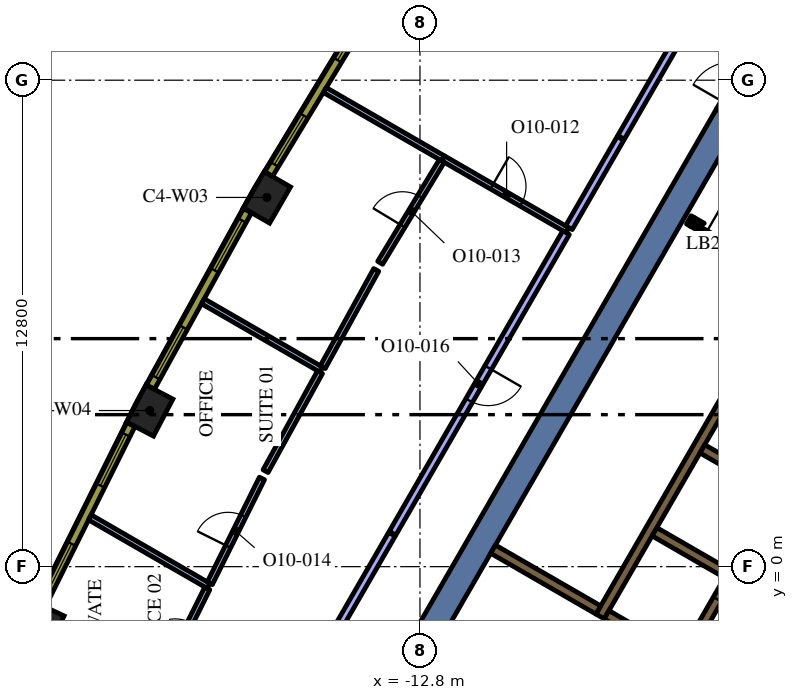
"""IFC4 building model, lengths in metres.
Left out: names, types, materials, properties, quantities, classifications, styles, units other than length and angle.
Written with IfcOpenShell. Run it as: python <this file> out.ifc"""

import sys

from ifc_helpers import new_model, si_unit, direction, frame, frame_2d, origin, origin_2d, place, context, subcontext, project, spatial, polyline, rectangle, outline, extrude, element, fill, save


model = new_model("IFC4")
c1 = context("Model", 3, precision=1e-05, world=origin(), true_north=direction((0.0, 1.0)))
c2 = subcontext(c1, "Body", "Model", "MODEL_VIEW")
j1 = project(units=[si_unit("LENGTHUNIT", "METRE"), si_unit("PLANEANGLEUNIT", "RADIAN")], contexts=[c1])
p1 = place(None, origin())
s1 = spatial("IfcSite", under=j1, at=p1, CompositionType="ELEMENT")
p2 = place(p1, origin())
s2 = spatial("IfcBuilding", under=s1, at=p2, CompositionType="ELEMENT")
p3 = place(p2, frame((0.0, 0.0, 252.0)))
s3 = spatial("IfcBuildingStorey", under=s2, at=p3, CompositionType="ELEMENT", Elevation=252.0)
for number, where, z_axis, x_axis in (
    (1, (-16.827, 9.715, 0.0), (0.0, 0.0, 1.0), (-0.5, -0.866, 0.0)),
    (2, (-19.912, 4.108, 0.0), (0.0, 0.0, 1.0), (-0.464, -0.886, 0.0)),
    (3, (-22.76, -1.623, 0.0), (0.0, 0.0, 1.0), (-0.426, -0.905, 0.0)),
):
    element("IfcColumn", number, at=place(p3, frame(where, z_axis=z_axis, x_axis=x_axis)), inside=s3, PredefinedType="COLUMN", context=c2, shape_type="SweptSolid", body=[
        extrude(rectangle(XDim=1.1, YDim=0.8, at=origin_2d()), origin(), (0.0, 0.0, 1.0), 4.2),
    ])
p4 = place(p3, frame((-12.625, -1.867, 0.0), z_axis=(0.0, 0.0, 1.0), x_axis=(0.499996974394, 0.866027150612, 0.0)))
e4 = element("IfcWall", 4, at=p4, inside=s3, PredefinedType="SOLIDWALL", context=c2, shape_type="SweptSolid", body=[
    extrude(rectangle(XDim=15.858, YDim=0.7, at=frame_2d((7.929, 0.0))), origin(), (0.0, 0.0, 1.0), 4.2),
])
p5 = place(p3, frame((-8.06, -1.311, 0.0), z_axis=(0.0, 0.0, 1.0), x_axis=(0.50000273126, 0.866023826885, 0.0)))
e5 = element("IfcWall", 5, at=p5, inside=s3, PredefinedType="SOLIDWALL", context=c2, shape_type="SweptSolid", body=[
    extrude(rectangle(XDim=10.33, YDim=0.25, at=frame_2d((5.165, 0.0))), origin(), (0.0, 0.0, 1.0), 4.2),
])
for number, where, z_axis, x_axis in (
    (6, (-5.369, 3.1, 0.0), (0.0, 0.0, 1.0), (0.866, -0.5, 0.0)),
    (7, (-4.724, -0.182, 0.0), (0.0, 0.0, 1.0), (-0.866, 0.5, 0.0)),
):
    element("IfcWall", number, at=place(p3, frame(where, z_axis=z_axis, x_axis=x_axis)), inside=s3, PredefinedType="SOLIDWALL", context=c2, shape_type="SweptSolid", body=[
        extrude(rectangle(XDim=2.2, YDim=0.25, at=frame_2d((1.1, 0.0))), origin(), (0.0, 0.0, 1.0), 4.2),
    ])
p6 = place(p3, origin())
e8 = element("IfcWall", 8, at=p6, inside=s3, PredefinedType="SOLIDWALL", context=c2, shape_type="SweptSolid", body=[
    extrude(outline(polyline([(-5.922, -2.257), (-5.922, -2.257), (-5.705, -2.382), (-5.83, -2.598), (-6.483, -2.221), (-6.591, -2.033), (-6.591, -2.033), (-6.7, -2.096), (-7.952, -1.373), (-7.827, -1.156), (-5.922, -2.257)])), origin(), (0.0, 0.0, 1.0), 4.2),
])
p7 = place(p3, frame((-8.106, -1.14, 0.0), z_axis=(0.0, 0.0, 1.0), x_axis=(-0.866008981251, 0.500028443584, 0.0)))
e9 = element("IfcWall", 9, at=p7, inside=s3, PredefinedType="SOLIDWALL", context=c2, shape_type="SweptSolid", body=[
    extrude(rectangle(XDim=3.2, YDim=0.25, at=frame_2d((1.6, 0.0))), origin(), (0.0, 0.0, 1.0), 4.2),
])
p8 = place(p3, frame((-5.725, 9.125, 0.0), z_axis=(0.0, 0.0, 1.0), x_axis=(0.866185586049, -0.49972245349, 0.0)))
e10 = element("IfcWall", 10, at=p8, inside=s3, PredefinedType="SOLIDWALL", context=c2, shape_type="SweptSolid", body=[
    extrude(rectangle(XDim=0.11, YDim=0.25, at=frame_2d((0.055, 0.0))), origin(), (0.0, 0.0, 1.0), 4.2),
])
e11 = element("IfcWall", 11, at=p6, inside=s3, PredefinedType="SOLIDWALL", context=c2, shape_type="SweptSolid", body=[
    extrude(outline(polyline([(-5.689, 8.96), (-5.69, 8.961), (-5.565, 9.177), (-5.319, 9.035), (-5.335, 9.026), (-5.351, 9.015), (-5.366, 9.002), (-5.379, 8.988), (-5.392, 8.972), (-5.402, 8.956), (-5.412, 8.939), (-5.629, 9.064), (-5.629, 9.064), (-5.689, 8.96)])), origin(), (0.0, 0.0, 1.0), 4.2),
])
p9 = place(p3, frame((-0.898, 6.194, 0.0), z_axis=(0.0, 0.0, 1.0), x_axis=(-0.499996202215, -0.866027596426, 0.0)))
e12 = element("IfcWall", 12, at=p9, inside=s3, PredefinedType="SOLIDWALL", context=c2, shape_type="SweptSolid", body=[
    extrude(rectangle(XDim=9.83, YDim=0.25, at=frame_2d((4.915, 0.0))), origin(), (0.0, 0.0, 1.0), 4.2),
])
p10 = place(p9, frame((0.585, 0.0, 0.0)))
e13 = element("IfcOpeningElement", 13, at=p10, cuts=e12, PredefinedType="OPENING", context=c2, shape_type="SweptSolid", body=[
    extrude(rectangle(XDim=1.1, YDim=2.1, at=frame_2d((0.55, 1.05))), frame((0.0, 0.135, 0.0), z_axis=(0.0, -1.0, 0.0), x_axis=(1.0, 0.0, 0.0)), (0.0, 0.0, 1.0), 0.27),
])
p11 = place(p9, frame((3.105, 0.0, 0.0)))
e14 = element("IfcOpeningElement", 14, at=p11, cuts=e12, PredefinedType="OPENING", context=c2, shape_type="SweptSolid", body=[
    extrude(rectangle(XDim=1.1, YDim=2.1, at=frame_2d((0.55, 1.05))), frame((0.0, 0.135, 0.0), z_axis=(0.0, -1.0, 0.0), x_axis=(1.0, 0.0, 0.0)), (0.0, 0.0, 1.0), 0.27),
])
p12 = place(p9, frame((5.625, 0.0, 0.0)))
e15 = element("IfcOpeningElement", 15, at=p12, cuts=e12, PredefinedType="OPENING", context=c2, shape_type="SweptSolid", body=[
    extrude(rectangle(XDim=1.1, YDim=2.1, at=frame_2d((0.55, 1.05))), frame((0.0, 0.135, 0.0), z_axis=(0.0, -1.0, 0.0), x_axis=(1.0, 0.0, 0.0)), (0.0, 0.0, 1.0), 0.27),
])
p13 = place(p9, frame((8.145, 0.0, 0.0)))
e16 = element("IfcOpeningElement", 16, at=p13, cuts=e12, PredefinedType="OPENING", context=c2, shape_type="SweptSolid", body=[
    extrude(rectangle(XDim=1.1, YDim=2.1, at=frame_2d((0.55, 1.05))), frame((0.0, 0.135, 0.0), z_axis=(0.0, -1.0, 0.0), x_axis=(1.0, 0.0, 0.0)), (0.0, 0.0, 1.0), 0.27),
])
p14 = place(p3, frame((-5.659, 9.012, 0.0), z_axis=(0.0, 0.0, 1.0), x_axis=(0.866009402589, -0.500027713859, 0.0)))
e17 = element("IfcWall", 17, at=p14, inside=s3, PredefinedType="PARTITIONING", context=c2, shape_type="SweptSolid", body=[
    extrude(rectangle(XDim=2.1, YDim=0.12, at=frame_2d((1.05, 0.0))), origin(), (0.0, 0.0, 1.0), 3.4),
])
p15 = place(p14, frame((0.45, 0.0, 0.0)))
e18 = element("IfcOpeningElement", 18, at=p15, cuts=e17, PredefinedType="OPENING", context=c2, shape_type="SweptSolid", body=[
    extrude(rectangle(XDim=1.2, YDim=2.1, at=frame_2d((0.6, 1.05))), frame((0.0, 0.07, 0.0), z_axis=(0.0, -1.0, 0.0), x_axis=(1.0, 0.0, 0.0)), (0.0, 0.0, 1.0), 0.14),
])
p16 = place(p3, frame((-4.696, 11.867, 0.0), z_axis=(0.0, 0.0, 1.0), x_axis=(0.499892348375, 0.866087547558, 0.0)))
e19 = element("IfcWall", 19, at=p16, inside=s3, PredefinedType="SOLIDWALL", context=c2, shape_type="SweptSolid", body=[
    extrude(rectangle(XDim=1.7, YDim=0.7, at=frame_2d((0.85, 0.0))), origin(), (0.0, 0.0, 1.0), 4.2),
])
p17 = place(p16, frame((0.25, 0.0, 0.0)))
e20 = element("IfcOpeningElement", 20, at=p17, cuts=e19, PredefinedType="OPENING", context=c2, shape_type="SweptSolid", body=[
    extrude(rectangle(XDim=1.2, YDim=2.1, at=frame_2d((0.6, 1.05))), frame((0.0, 0.36, 0.0), z_axis=(0.0, -1.0, 0.0), x_axis=(1.0, 0.0, 0.0)), (0.0, 0.0, 1.0), 0.72),
])
p18 = place(p3, frame((-12.182, 10.738, 0.0), z_axis=(0.0, 0.0, 1.0), x_axis=(-0.866042351264, 0.499970644955, 0.0)))
e21 = element("IfcWall", 21, at=p18, inside=s3, PredefinedType="PARTITIONING", context=c2, shape_type="SweptSolid", body=[
    extrude(rectangle(XDim=3.605, YDim=0.15, at=frame_2d((1.802, 0.0))), origin(), (0.0, 0.0, 1.0), 3.4),
])
p19 = place(p3, frame((-12.189, 10.742, 0.0), z_axis=(0.0, 0.0, 1.0), x_axis=(0.866023060049, -0.500004059447, 0.0)))
e22 = element("IfcWall", 22, at=p19, inside=s3, PredefinedType="PARTITIONING", context=c2, shape_type="SweptSolid", body=[
    extrude(rectangle(XDim=3.777, YDim=0.15, at=frame_2d((1.889, 0.0))), origin(), (0.0, 0.0, 1.0), 3.4),
])
p20 = place(p19, frame((1.477, 0.0, 0.0)))
e23 = element("IfcOpeningElement", 23, at=p20, cuts=e22, PredefinedType="OPENING", context=c2, shape_type="SweptSolid", body=[
    extrude(rectangle(XDim=0.9, YDim=2.1, at=frame_2d((0.45, 1.05))), frame((0.0, 0.085, 0.0), z_axis=(0.0, -1.0, 0.0), x_axis=(1.0, 0.0, 0.0)), (0.0, 0.0, 1.0), 0.17),
])
p21 = place(p3, frame((-7.522, 11.271, 0.0), z_axis=(0.0, 0.0, 1.0), x_axis=(-0.500005085581, -0.866022467603, 0.0)))
e24 = element("IfcWall", 24, at=p21, inside=s3, PredefinedType="PARTITIONING", context=c2, shape_type="SweptSolid", body=[
    extrude(rectangle(XDim=2.717, YDim=0.2, at=frame_2d((1.358, 0.0))), origin(), (0.0, 0.0, 1.0), 3.4),
])
p22 = place(p3, frame((-3.349, 18.5, 0.0), z_axis=(0.0, 0.0, 1.0), x_axis=(-0.499987561347, -0.866032585125, 0.0)))
e25 = element("IfcWall", 25, at=p22, inside=s3, PredefinedType="PARTITIONING", context=c2, shape_type="SweptSolid", body=[
    extrude(rectangle(XDim=8.317, YDim=0.2, at=frame_2d((4.159, 0.0))), origin(), (0.0, 0.0, 1.0), 3.4),
])
p23 = place(p3, frame((-15.394, 5.183, 0.0), z_axis=(0.0, 0.0, 1.0), x_axis=(-0.866039935929, 0.499974828743, 0.0)))
e26 = element("IfcWall", 26, at=p23, inside=s3, PredefinedType="PARTITIONING", context=c2, shape_type="SweptSolid", body=[
    extrude(rectangle(XDim=3.601, YDim=0.15, at=frame_2d((1.8, 0.0))), origin(), (0.0, 0.0, 1.0), 3.4),
])
p24 = place(p3, frame((-13.848, 7.995, 0.0), z_axis=(0.0, 0.0, 1.0), x_axis=(0.51785968959, 0.855465570258, 0.0)))
e27 = element("IfcWall", 27, at=p24, inside=s3, PredefinedType="PARTITIONING", context=c2, shape_type="SweptSolid", body=[
    extrude(rectangle(XDim=3.134, YDim=0.15, at=frame_2d((1.567, 0.0))), origin(), (0.0, 0.0, 1.0), 3.4),
])
p25 = place(p24, frame((1.134, 0.0, 0.0)))
e28 = element("IfcOpeningElement", 28, at=p25, cuts=e27, PredefinedType="OPENING", context=c2, shape_type="SweptSolid", body=[
    extrude(rectangle(XDim=0.9, YDim=2.1, at=frame_2d((0.45, 1.05))), frame((0.0, 0.085, 0.0), z_axis=(0.0, -1.0, 0.0), x_axis=(1.0, 0.0, 0.0)), (0.0, 0.0, 1.0), 0.17),
])
p26 = place(p3, frame((-13.951, 7.807, 0.0), z_axis=(0.0, 0.0, 1.0), x_axis=(-0.481889860414, -0.876231797203, 0.0)))
e29 = element("IfcWall", 29, at=p26, inside=s3, PredefinedType="PARTITIONING", context=c2, shape_type="SweptSolid", body=[
    extrude(rectangle(XDim=2.92, YDim=0.15, at=frame_2d((1.46, 0.0))), origin(), (0.0, 0.0, 1.0), 3.4),
])
p27 = place(p3, frame((-18.363, -0.506, 0.0), z_axis=(0.0, 0.0, 1.0), x_axis=(-0.866048087663, 0.499960708312, 0.0)))
e30 = element("IfcWall", 30, at=p27, inside=s3, PredefinedType="PARTITIONING", context=c2, shape_type="SweptSolid", body=[
    extrude(rectangle(XDim=3.607, YDim=0.15, at=frame_2d((1.804, 0.0))), origin(), (0.0, 0.0, 1.0), 3.4),
])
p28 = place(p3, frame((-15.43, 5.117, 0.0), z_axis=(0.0, 0.0, 1.0), x_axis=(-0.481893525381, -0.876229781619, 0.0)))
e31 = element("IfcWall", 31, at=p28, inside=s3, PredefinedType="PARTITIONING", context=c2, shape_type="SweptSolid", body=[
    extrude(rectangle(XDim=2.972, YDim=0.15, at=frame_2d((1.486, 0.0))), origin(), (0.0, 0.0, 1.0), 3.4),
])
p29 = place(p3, frame((-18.33, -0.438, 0.0), z_axis=(0.0, 0.0, 1.0), x_axis=(0.445184199442, 0.895439014432, 0.0)))
e32 = element("IfcWall", 32, at=p29, inside=s3, PredefinedType="PARTITIONING", context=c2, shape_type="SweptSolid", body=[
    extrude(rectangle(XDim=3.082, YDim=0.15, at=frame_2d((1.541, 0.0))), origin(), (0.0, 0.0, 1.0), 3.4),
])
p30 = place(p29, frame((1.081, 0.0, 0.0)))
e33 = element("IfcOpeningElement", 33, at=p30, cuts=e32, PredefinedType="OPENING", context=c2, shape_type="SweptSolid", body=[
    extrude(rectangle(XDim=0.9, YDim=2.1, at=frame_2d((0.45, 1.05))), frame((0.0, 0.085, 0.0), z_axis=(0.0, -1.0, 0.0), x_axis=(1.0, 0.0, 0.0)), (0.0, 0.0, 1.0), 0.17),
])
p31 = place(p3, frame((-19.648, -3.09, 0.0), z_axis=(0.0, 0.0, 1.0), x_axis=(0.445162501923, 0.89544980143, 0.0)))
e34 = element("IfcWall", 34, at=p31, inside=s3, PredefinedType="PARTITIONING", context=c2, shape_type="SweptSolid", body=[
    extrude(rectangle(XDim=2.811, YDim=0.15, at=frame_2d((1.405, 0.0))), origin(), (0.0, 0.0, 1.0), 3.4),
])
p32 = place(p31, frame((0.911, 0.0, 0.0)))
e35 = element("IfcOpeningElement", 35, at=p32, cuts=e34, PredefinedType="OPENING", context=c2, shape_type="SweptSolid", body=[
    extrude(rectangle(XDim=0.9, YDim=2.1, at=frame_2d((0.45, 1.05))), frame((0.0, 0.085, 0.0), z_axis=(0.0, -1.0, 0.0), x_axis=(1.0, 0.0, 0.0)), (0.0, 0.0, 1.0), 0.17),
])
p33 = place(p3, frame((-8.956, 8.789, 0.0), z_axis=(0.0, 0.0, 1.0), x_axis=(-0.500000119864, -0.866025334581, 0.0)))
e36 = element("IfcWall", 36, at=p33, inside=s3, PredefinedType="PARTITIONING", context=c2, shape_type="SweptSolid", body=[
    extrude(rectangle(XDim=9.133, YDim=0.2, at=frame_2d((4.567, 0.0))), origin(), (0.0, 0.0, 1.0), 3.4),
])
p34 = place(p33, frame((4.1, 0.0, 0.0)))
e37 = element("IfcOpeningElement", 37, at=p34, cuts=e36, PredefinedType="OPENING", context=c2, shape_type="SweptSolid", body=[
    extrude(rectangle(XDim=1.0, YDim=2.1, at=frame_2d((0.5, 1.05))), frame((0.0, 0.11, 0.0), z_axis=(0.0, -1.0, 0.0), x_axis=(1.0, 0.0, 0.0)), (0.0, 0.0, 1.0), 0.22),
])
p35 = place(p3, frame((-13.537, 0.853, 0.0), z_axis=(0.0, 0.0, 1.0), x_axis=(-0.500009576767, -0.866019874565, 0.0)))
e38 = element("IfcWall", 38, at=p35, inside=s3, PredefinedType="PARTITIONING", context=c2, shape_type="SweptSolid", body=[
    extrude(rectangle(XDim=8.317, YDim=0.2, at=frame_2d((4.159, 0.0))), origin(), (0.0, 0.0, 1.0), 3.4),
])
p36 = place(p3, frame((-14.038, 14.864, 0.0), z_axis=(0.0, 0.0, 1.0), x_axis=(-0.517846166225, -0.855473756538, 0.0)))
e39 = element("IfcWall", 39, at=p36, inside=s3, PredefinedType="SOLIDWALL", context=c2, shape_type="SweptSolid", body=[
    extrude(rectangle(XDim=5.298, YDim=0.24, at=frame_2d((2.649, 0.0))), origin(), (0.0, 0.0, 1.0), 3.9),
])
p37 = place(p36, frame((0.294, 0.0, 0.9)))
e40 = element("IfcOpeningElement", 40, at=p37, cuts=e39, PredefinedType="OPENING", context=c2, shape_type="SweptSolid", body=[
    extrude(rectangle(XDim=1.5, YDim=2.55, at=frame_2d((0.75, 1.275))), frame((0.0, 0.13, 0.0), z_axis=(0.0, -1.0, 0.0), x_axis=(1.0, 0.0, 0.0)), (0.0, 0.0, 1.0), 0.26),
])
p38 = place(p36, frame((3.504, 0.0, 0.9)))
e41 = element("IfcOpeningElement", 41, at=p38, cuts=e39, PredefinedType="OPENING", context=c2, shape_type="SweptSolid", body=[
    extrude(rectangle(XDim=1.5, YDim=2.55, at=frame_2d((0.75, 1.275))), frame((0.0, 0.13, 0.0), z_axis=(0.0, -1.0, 0.0), x_axis=(1.0, 0.0, 0.0)), (0.0, 0.0, 1.0), 0.26),
])
p39 = place(p3, frame((-17.338, 9.368, 0.0), z_axis=(0.0, 0.0, 1.0), x_axis=(-0.481925825015, -0.876212017256, 0.0)))
e42 = element("IfcWall", 42, at=p39, inside=s3, PredefinedType="SOLIDWALL", context=c2, shape_type="SweptSolid", body=[
    extrude(rectangle(XDim=5.299, YDim=0.24, at=frame_2d((2.649, 0.0))), origin(), (0.0, 0.0, 1.0), 3.9),
])
p40 = place(p39, frame((0.295, 0.0, 0.9)))
e43 = element("IfcOpeningElement", 43, at=p40, cuts=e42, PredefinedType="OPENING", context=c2, shape_type="SweptSolid", body=[
    extrude(rectangle(XDim=1.5, YDim=2.55, at=frame_2d((0.75, 1.275))), frame((0.0, 0.13, 0.0), z_axis=(0.0, -1.0, 0.0), x_axis=(1.0, 0.0, 0.0)), (0.0, 0.0, 1.0), 0.26),
])
p41 = place(p39, frame((3.504, 0.0, 0.9)))
e44 = element("IfcOpeningElement", 44, at=p41, cuts=e42, PredefinedType="OPENING", context=c2, shape_type="SweptSolid", body=[
    extrude(rectangle(XDim=1.5, YDim=2.55, at=frame_2d((0.75, 1.275))), frame((0.0, 0.13, 0.0), z_axis=(0.0, -1.0, 0.0), x_axis=(1.0, 0.0, 0.0)), (0.0, 0.0, 1.0), 0.26),
])
p42 = place(p3, frame((-20.407, 3.74, 0.0), z_axis=(0.0, 0.0, 1.0), x_axis=(-0.445129582031, -0.895466166419, 0.0)))
e45 = element("IfcWall", 45, at=p42, inside=s3, PredefinedType="SOLIDWALL", context=c2, shape_type="SweptSolid", body=[
    extrude(rectangle(XDim=5.298, YDim=0.24, at=frame_2d((2.649, 0.0))), origin(), (0.0, 0.0, 1.0), 3.9),
])
p43 = place(p42, frame((0.295, 0.0, 0.9)))
e46 = element("IfcOpeningElement", 46, at=p43, cuts=e45, PredefinedType="OPENING", context=c2, shape_type="SweptSolid", body=[
    extrude(rectangle(XDim=1.5, YDim=2.55, at=frame_2d((0.75, 1.275))), frame((0.0, 0.13, 0.0), z_axis=(0.0, -1.0, 0.0), x_axis=(1.0, 0.0, 0.0)), (0.0, 0.0, 1.0), 0.26),
])
p44 = place(p42, frame((3.504, 0.0, 0.9)))
e47 = element("IfcOpeningElement", 47, at=p44, cuts=e45, PredefinedType="OPENING", context=c2, shape_type="SweptSolid", body=[
    extrude(rectangle(XDim=1.5, YDim=2.55, at=frame_2d((0.75, 1.275))), frame((0.0, 0.13, 0.0), z_axis=(0.0, -1.0, 0.0), x_axis=(1.0, 0.0, 0.0)), (0.0, 0.0, 1.0), 0.26),
])
p45 = place(p13, origin())
e48 = element("IfcDoor", 48, at=p45, inside=s3, OperationType="DOUBLE_DOOR_SLIDING", PredefinedType="DOOR", context=c2, shape_type="SweptSolid", body=[
    extrude(rectangle(XDim=1.1, YDim=2.1, at=frame_2d((0.55, 1.05))), frame((0.0, 0.025, 0.0), z_axis=(0.0, -1.0, 0.0), x_axis=(1.0, 0.0, 0.0)), (0.0, 0.0, 1.0), 0.05),
])
fill(e16, e48)
p46 = place(p15, origin())
e49 = element("IfcDoor", 49, at=p46, inside=s3, OperationType="SINGLE_SWING_LEFT", PredefinedType="DOOR", context=c2, shape_type="SweptSolid", body=[
    extrude(rectangle(XDim=1.2, YDim=2.1, at=frame_2d((0.6, 1.05))), frame((0.0, 0.025, 0.0), z_axis=(0.0, -1.0, 0.0), x_axis=(1.0, 0.0, 0.0)), (0.0, 0.0, 1.0), 0.05),
])
fill(e18, e49)
p47 = place(p20, origin())
e50 = element("IfcDoor", 50, at=p47, inside=s3, OperationType="SINGLE_SWING_RIGHT", PredefinedType="DOOR", context=c2, shape_type="SweptSolid", body=[
    extrude(rectangle(XDim=0.9, YDim=2.1, at=frame_2d((0.45, 1.05))), frame((0.0, 0.025, 0.0), z_axis=(0.0, -1.0, 0.0), x_axis=(1.0, 0.0, 0.0)), (0.0, 0.0, 1.0), 0.05),
])
fill(e23, e50)
p48 = place(p25, origin())
e51 = element("IfcDoor", 51, at=p48, inside=s3, OperationType="SINGLE_SWING_RIGHT", PredefinedType="DOOR", context=c2, shape_type="SweptSolid", body=[
    extrude(rectangle(XDim=0.9, YDim=2.1, at=frame_2d((0.45, 1.05))), frame((0.0, 0.025, 0.0), z_axis=(0.0, -1.0, 0.0), x_axis=(1.0, 0.0, 0.0)), (0.0, 0.0, 1.0), 0.05),
])
fill(e28, e51)
p49 = place(p30, origin())
e52 = element("IfcDoor", 52, at=p49, inside=s3, OperationType="SINGLE_SWING_LEFT", PredefinedType="DOOR", context=c2, shape_type="SweptSolid", body=[
    extrude(rectangle(XDim=0.9, YDim=2.1, at=frame_2d((0.45, 1.05))), frame((0.0, 0.025, 0.0), z_axis=(0.0, -1.0, 0.0), x_axis=(1.0, 0.0, 0.0)), (0.0, 0.0, 1.0), 0.05),
])
fill(e33, e52)
p50 = place(p34, origin())
e53 = element("IfcDoor", 53, at=p50, inside=s3, OperationType="SINGLE_SWING_RIGHT", PredefinedType="DOOR", context=c2, shape_type="SweptSolid", body=[
    extrude(rectangle(XDim=1.0, YDim=2.1, at=frame_2d((0.5, 1.05))), frame((0.0, 0.025, 0.0), z_axis=(0.0, -1.0, 0.0), x_axis=(1.0, 0.0, 0.0)), (0.0, 0.0, 1.0), 0.05),
])
fill(e37, e53)
p51 = place(p37, origin())
e54 = element("IfcWindow", 54, at=p51, inside=s3, PartitioningType="SINGLE_PANEL", PredefinedType="WINDOW", context=c2, shape_type="SweptSolid", body=[
    extrude(rectangle(XDim=1.5, YDim=2.55, at=frame_2d((0.75, 1.275))), frame((0.0, 0.04, 0.0), z_axis=(0.0, -1.0, 0.0), x_axis=(1.0, 0.0, 0.0)), (0.0, 0.0, 1.0), 0.06),
])
fill(e40, e54)
p52 = place(p38, origin())
e55 = element("IfcWindow", 55, at=p52, inside=s3, PartitioningType="SINGLE_PANEL", PredefinedType="WINDOW", context=c2, shape_type="SweptSolid", body=[
    extrude(rectangle(XDim=1.5, YDim=2.55, at=frame_2d((0.75, 1.275))), frame((0.0, 0.04, 0.0), z_axis=(0.0, -1.0, 0.0), x_axis=(1.0, 0.0, 0.0)), (0.0, 0.0, 1.0), 0.06),
])
fill(e41, e55)
p53 = place(p40, origin())
e56 = element("IfcWindow", 56, at=p53, inside=s3, PartitioningType="SINGLE_PANEL", PredefinedType="WINDOW", context=c2, shape_type="SweptSolid", body=[
    extrude(rectangle(XDim=1.5, YDim=2.55, at=frame_2d((0.75, 1.275))), frame((0.0, 0.04, 0.0), z_axis=(0.0, -1.0, 0.0), x_axis=(1.0, 0.0, 0.0)), (0.0, 0.0, 1.0), 0.06),
])
fill(e43, e56)
p54 = place(p41, origin())
e57 = element("IfcWindow", 57, at=p54, inside=s3, PartitioningType="SINGLE_PANEL", PredefinedType="WINDOW", context=c2, shape_type="SweptSolid", body=[
    extrude(rectangle(XDim=1.5, YDim=2.55, at=frame_2d((0.75, 1.275))), frame((0.0, 0.04, 0.0), z_axis=(0.0, -1.0, 0.0), x_axis=(1.0, 0.0, 0.0)), (0.0, 0.0, 1.0), 0.06),
])
fill(e44, e57)
p55 = place(p43, origin())
e58 = element("IfcWindow", 58, at=p55, inside=s3, PartitioningType="SINGLE_PANEL", PredefinedType="WINDOW", context=c2, shape_type="SweptSolid", body=[
    extrude(rectangle(XDim=1.5, YDim=2.55, at=frame_2d((0.75, 1.275))), frame((0.0, 0.04, 0.0), z_axis=(0.0, -1.0, 0.0), x_axis=(1.0, 0.0, 0.0)), (0.0, 0.0, 1.0), 0.06),
])
fill(e46, e58)
p56 = place(p44, origin())
e59 = element("IfcWindow", 59, at=p56, inside=s3, PartitioningType="SINGLE_PANEL", PredefinedType="WINDOW", context=c2, shape_type="SweptSolid", body=[
    extrude(rectangle(XDim=1.5, YDim=2.55, at=frame_2d((0.75, 1.275))), frame((0.0, 0.04, 0.0), z_axis=(0.0, -1.0, 0.0), x_axis=(1.0, 0.0, 0.0)), (0.0, 0.0, 1.0), 0.06),
])
fill(e47, e59)
save(model, sys.argv[1])
